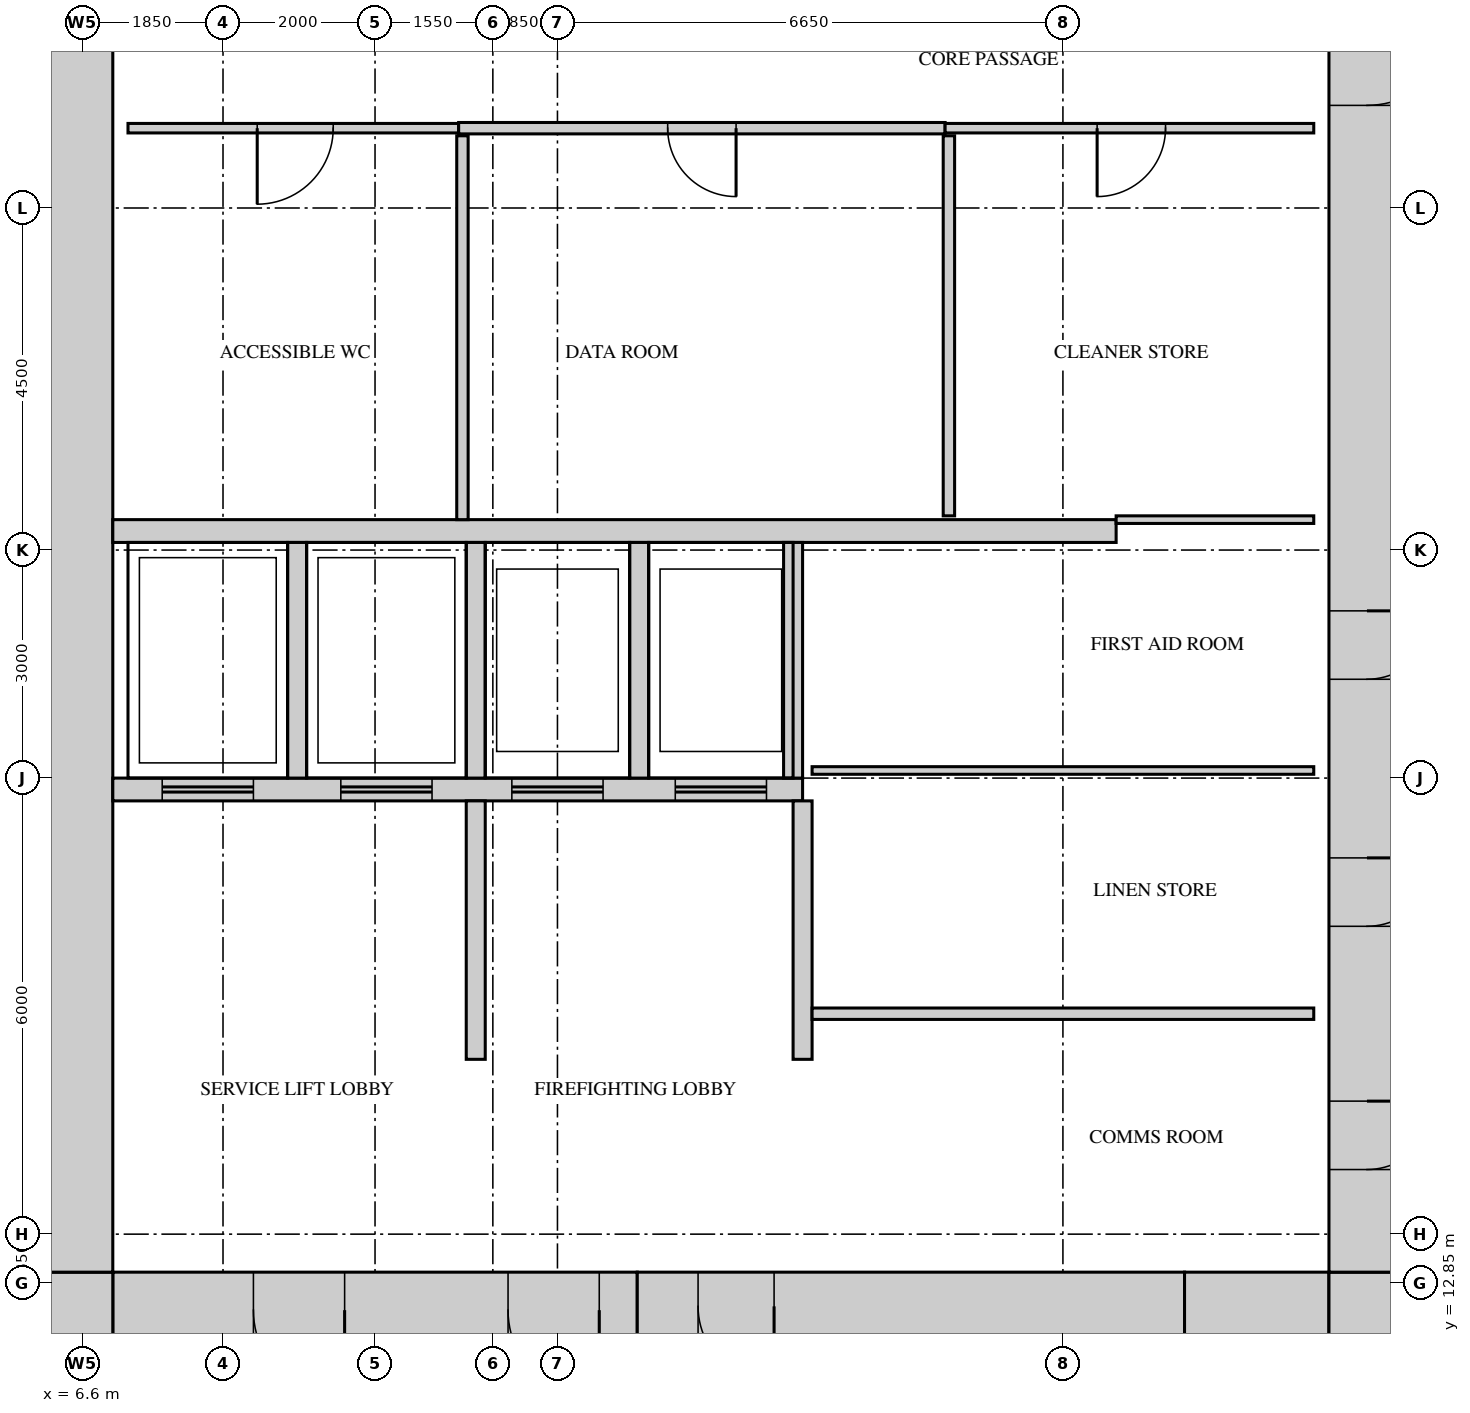
"""IFC4 building model, lengths in metres.
Left out: names, types, materials, properties, quantities, classifications, styles, units other than length and angle.
Written with IfcOpenShell. Run it as: python <this file> out.ifc"""

import sys

from ifc_helpers import new_model, si_unit, direction, frame, frame_2d, origin, place, context, subcontext, project, spatial, rectangle, extrude, source, transform, mapped, element, fill, save


model = new_model("IFC4")
c1 = context("Model", 3, precision=1e-05, world=origin(), true_north=direction((0.0, 1.0)))
c2 = subcontext(c1, "Body", "Model", "MODEL_VIEW")
j1 = project(units=[si_unit("LENGTHUNIT", "METRE"), si_unit("PLANEANGLEUNIT", "RADIAN")], contexts=[c1])
p1 = place(None, origin())
s1 = spatial("IfcSite", under=j1, at=p1, CompositionType="ELEMENT")
p2 = place(p1, origin())
s2 = spatial("IfcBuilding", under=s1, at=p2, CompositionType="ELEMENT")
p3 = place(p2, frame((0.0, 0.0, 127.9)))
s3 = spatial("IfcBuildingStorey", under=s2, at=p3, CompositionType="ELEMENT", Elevation=127.9)
m1 = source(origin(), c2, "Body", "SweptSolid", [
    extrude(rectangle(XDim=6.9, YDim=1.0, at=frame_2d((3.45, 0.0))), origin(), (0.0, 0.0, 1.0), 4.1),
])
p4 = place(p3, frame((7.0, 12.5, 0.0), z_axis=(0.0, 0.0, 1.0), x_axis=(1.0, 0.0, 0.0)))
e1 = element("IfcWall", 1, at=p4, inside=s3, PredefinedType="SHEAR", context=c2, shape_type="MappedRepresentation", body=[
    mapped(m1, transform((0.0, 0.0, 0.0))),
])
m2 = source(origin(), c2, "Body", "SweptSolid", [
    extrude(rectangle(XDim=1.2, YDim=2.1, at=frame_2d((0.6, 1.05))), frame((0.0, 0.51, 0.0), z_axis=(0.0, -1.0, 0.0), x_axis=(1.0, 0.0, 0.0)), (0.0, 0.0, 1.0), 1.02),
])
p5 = place(p4, frame((5.2, 0.0, 0.0)))
e2 = element("IfcOpeningElement", 2, at=p5, cuts=e1, PredefinedType="OPENING", context=c2, shape_type="MappedRepresentation", body=[
    mapped(m2, transform((0.0, 0.0, 0.0))),
])
p6 = place(p4, frame((1.85, 0.0, 0.0)))
e3 = element("IfcOpeningElement", 3, at=p6, cuts=e1, PredefinedType="OPENING", context=c2, shape_type="MappedRepresentation", body=[
    mapped(m2, transform((0.0, 0.0, 0.0))),
])
m3 = source(origin(), c2, "Body", "SweptSolid", [
    extrude(rectangle(XDim=7.2, YDim=0.9, at=frame_2d((3.6, 0.0))), origin(), (0.0, 0.0, 1.0), 4.1),
])
p7 = place(p3, frame((13.9, 12.55, 0.0), z_axis=(0.0, 0.0, 1.0), x_axis=(1.0, 0.0, 0.0)))
e4 = element("IfcWall", 4, at=p7, inside=s3, PredefinedType="SHEAR", context=c2, shape_type="MappedRepresentation", body=[
    mapped(m3, transform((0.0, 0.0, 0.0))),
])
m4 = source(origin(), c2, "Body", "SweptSolid", [
    extrude(rectangle(XDim=1.0, YDim=2.1, at=frame_2d((0.5, 1.05))), frame((0.0, 0.46, 0.0), z_axis=(0.0, -1.0, 0.0), x_axis=(1.0, 0.0, 0.0)), (0.0, 0.0, 1.0), 0.92),
])
p8 = place(p7, frame((0.8, 0.0, 0.0)))
e5 = element("IfcOpeningElement", 5, at=p8, cuts=e4, PredefinedType="OPENING", context=c2, shape_type="MappedRepresentation", body=[
    mapped(m4, transform((0.0, 0.0, 0.0))),
])
m5 = source(origin(), c2, "Body", "SweptSolid", [
    extrude(rectangle(XDim=1.9, YDim=1.0, at=frame_2d((0.95, 0.0))), origin(), (0.0, 0.0, 1.0), 4.1),
])
p9 = place(p3, frame((21.1, 12.5, 0.0), z_axis=(0.0, 0.0, 1.0), x_axis=(1.0, 0.0, 0.0)))
e6 = element("IfcWall", 6, at=p9, inside=s3, PredefinedType="SHEAR", context=c2, shape_type="MappedRepresentation", body=[
    mapped(m5, transform((0.0, 0.0, 0.0))),
])
m6 = source(origin(), c2, "Body", "SweptSolid", [
    extrude(rectangle(XDim=1.0, YDim=1.0, at=frame_2d((0.5, 0.0))), origin(), (0.0, 0.0, 1.0), 4.1),
])
for number, where, z_axis, x_axis in (
    (7, (23.0, 12.5, 0.0), (0.0, 0.0, 1.0), (1.0, 0.0, 0.0)),
    (8, (6.0, 12.5, 0.0), (0.0, 0.0, 1.0), (1.0, 0.0, 0.0)),
):
    element("IfcWall", number, at=place(p3, frame(where, z_axis=z_axis, x_axis=x_axis)), inside=s3, PredefinedType="SHEAR", context=c2, shape_type="MappedRepresentation", body=[
        mapped(m6, transform((0.0, 0.0, 0.0))),
    ])
m7 = source(origin(), c2, "Body", "SweptSolid", [
    extrude(rectangle(XDim=28.0, YDim=1.0, at=frame_2d((14.0, 0.0))), origin(), (0.0, 0.0, 1.0), 4.1),
])
p10 = place(p3, frame((23.5, 13.0, 0.0), z_axis=(0.0, 0.0, 1.0), x_axis=(0.0, 1.0, 0.0)))
e9 = element("IfcWall", 9, at=p10, inside=s3, PredefinedType="SHEAR", context=c2, shape_type="MappedRepresentation", body=[
    mapped(m7, transform((0.0, 0.0, 0.0))),
])
m8 = source(origin(), c2, "Body", "SweptSolid", [
    extrude(rectangle(XDim=1.8, YDim=2.1, at=frame_2d((0.9, 1.05))), frame((0.0, 0.51, 0.0), z_axis=(0.0, -1.0, 0.0), x_axis=(1.0, 0.0, 0.0)), (0.0, 0.0, 1.0), 1.02),
])
p11 = place(p10, frame((22.6, 0.0, 0.0)))
e10 = element("IfcOpeningElement", 10, at=p11, cuts=e9, PredefinedType="OPENING", context=c2, shape_type="MappedRepresentation", body=[
    mapped(m8, transform((0.0, 0.0, 0.0))),
])
p12 = place(p10, frame((15.35, 0.0, 0.0)))
e11 = element("IfcOpeningElement", 11, at=p12, cuts=e9, PredefinedType="OPENING", context=c2, shape_type="MappedRepresentation", body=[
    mapped(m2, transform((0.0, 0.0, 0.0))),
])
m9 = source(origin(), c2, "Body", "SweptSolid", [
    extrude(rectangle(XDim=0.9, YDim=2.1, at=frame_2d((0.45, 1.05))), frame((0.0, 0.51, 0.0), z_axis=(0.0, -1.0, 0.0), x_axis=(1.0, 0.0, 0.0)), (0.0, 0.0, 1.0), 1.02),
])
p13 = place(p10, frame((1.35, 0.0, 0.0)))
e12 = element("IfcOpeningElement", 12, at=p13, cuts=e9, PredefinedType="OPENING", context=c2, shape_type="MappedRepresentation", body=[
    mapped(m9, transform((0.0, 0.0, 0.0))),
])
p14 = place(p10, frame((4.55, 0.0, 0.0)))
e13 = element("IfcOpeningElement", 13, at=p14, cuts=e9, PredefinedType="OPENING", context=c2, shape_type="MappedRepresentation", body=[
    mapped(m9, transform((0.0, 0.0, 0.0))),
])
p15 = place(p10, frame((7.8, 0.0, 0.0)))
e14 = element("IfcOpeningElement", 14, at=p15, cuts=e9, PredefinedType="OPENING", context=c2, shape_type="MappedRepresentation", body=[
    mapped(m9, transform((0.0, 0.0, 0.0))),
])
p16 = place(p3, frame((6.5, 13.0, 0.0), z_axis=(0.0, 0.0, 1.0), x_axis=(0.0, 1.0, 0.0)))
e15 = element("IfcWall", 15, at=p16, inside=s3, PredefinedType="SHEAR", context=c2, shape_type="MappedRepresentation", body=[
    mapped(m7, transform((0.0, 0.0, 0.0))),
])
m10 = source(origin(), c2, "Body", "SweptSolid", [
    extrude(rectangle(XDim=13.2, YDim=0.3, at=frame_2d((6.6, 0.0))), origin(), (0.0, 0.0, 1.0), 4.1),
])
p17 = place(p3, frame((7.0, 22.75, 0.0), z_axis=(0.0, 0.0, 1.0), x_axis=(1.0, 0.0, 0.0)))
e16 = element("IfcWall", 16, at=p17, inside=s3, PredefinedType="STANDARD", context=c2, shape_type="MappedRepresentation", body=[
    mapped(m10, transform((0.0, 0.0, 0.0))),
])
m11 = source(origin(), c2, "Body", "SweptSolid", [
    extrude(rectangle(XDim=9.075, YDim=0.3, at=frame_2d((4.538, 0.0))), origin(), (0.0, 0.0, 1.0), 4.1),
])
p18 = place(p3, frame((7.0, 19.35, 0.0), z_axis=(0.0, 0.0, 1.0), x_axis=(1.0, 0.0, 0.0)))
e17 = element("IfcWall", 17, at=p18, inside=s3, PredefinedType="STANDARD", context=c2, shape_type="MappedRepresentation", body=[
    mapped(m11, transform((0.0, 0.0, 0.0))),
])
m12 = source(origin(), c2, "Body", "SweptSolid", [
    extrude(rectangle(XDim=1.2, YDim=2.1, at=frame_2d((0.6, 1.05))), frame((0.0, 0.16, 0.0), z_axis=(0.0, -1.0, 0.0), x_axis=(1.0, 0.0, 0.0)), (0.0, 0.0, 1.0), 0.32),
])
p19 = place(p18, frame((0.65, 0.0, 0.0)))
e18 = element("IfcOpeningElement", 18, at=p19, cuts=e17, PredefinedType="OPENING", context=c2, shape_type="MappedRepresentation", body=[
    mapped(m12, transform((0.0, 0.0, 0.0))),
])
p20 = place(p18, frame((3.0, 0.0, 0.0)))
e19 = element("IfcOpeningElement", 19, at=p20, cuts=e17, PredefinedType="OPENING", context=c2, shape_type="MappedRepresentation", body=[
    mapped(m12, transform((0.0, 0.0, 0.0))),
])
p21 = place(p18, frame((5.25, 0.0, 0.0)))
e20 = element("IfcOpeningElement", 20, at=p21, cuts=e17, PredefinedType="OPENING", context=c2, shape_type="MappedRepresentation", body=[
    mapped(m12, transform((0.0, 0.0, 0.0))),
])
p22 = place(p18, frame((7.4, 0.0, 0.0)))
e21 = element("IfcOpeningElement", 21, at=p22, cuts=e17, PredefinedType="OPENING", context=c2, shape_type="MappedRepresentation", body=[
    mapped(m12, transform((0.0, 0.0, 0.0))),
])
m13 = source(origin(), c2, "Body", "SweptSolid", [
    extrude(rectangle(XDim=3.1, YDim=0.25, at=frame_2d((1.55, 0.0))), origin(), (0.0, 0.0, 1.0), 4.1),
])
for number, where, z_axis, x_axis in (
    (22, (9.425, 19.5, 0.0), (0.0, 0.0, 1.0), (0.0, 1.0, 0.0)),
    (23, (11.775, 19.5, 0.0), (0.0, 0.0, 1.0), (0.0, 1.0, 0.0)),
    (24, (13.925, 19.5, 0.0), (0.0, 0.0, 1.0), (0.0, 1.0, 0.0)),
    (25, (15.95, 19.5, 0.0), (0.0, 0.0, 1.0), (0.0, 1.0, 0.0)),
):
    element("IfcWall", number, at=place(p3, frame(where, z_axis=z_axis, x_axis=x_axis)), inside=s3, PredefinedType="STANDARD", context=c2, shape_type="MappedRepresentation", body=[
        mapped(m13, transform((0.0, 0.0, 0.0))),
    ])
m14 = source(origin(), c2, "Body", "SweptSolid", [
    extrude(rectangle(XDim=3.4, YDim=0.25, at=frame_2d((1.7, 0.0))), origin(), (0.0, 0.0, 1.0), 4.1),
])
for number, where, z_axis, x_axis in (
    (26, (16.075, 15.8, 0.0), (0.0, 0.0, 1.0), (0.0, 1.0, 0.0)),
    (27, (11.775, 15.8, 0.0), (0.0, 0.0, 1.0), (0.0, 1.0, 0.0)),
):
    element("IfcWall", number, at=place(p3, frame(where, z_axis=z_axis, x_axis=x_axis)), inside=s3, PredefinedType="STANDARD", context=c2, shape_type="MappedRepresentation", body=[
        mapped(m14, transform((0.0, 0.0, 0.0))),
    ])
m15 = source(origin(), c2, "Body", "SweptSolid", [
    extrude(rectangle(XDim=6.6, YDim=0.15, at=frame_2d((3.3, 0.0))), origin(), (0.0, 0.0, 1.0), 4.2),
])
p23 = place(p3, frame((16.2, 16.4, 0.0), z_axis=(0.0, 0.0, 1.0), x_axis=(1.0, 0.0, 0.0)))
e28 = element("IfcWall", 28, at=p23, inside=s3, PredefinedType="PARTITIONING", context=c2, shape_type="MappedRepresentation", body=[
    mapped(m15, transform((0.0, 0.0, 0.0))),
])
m16 = source(origin(), c2, "Body", "SweptSolid", [
    extrude(rectangle(XDim=6.6, YDim=0.1, at=frame_2d((3.3, 0.0))), origin(), (0.0, 0.0, 1.0), 4.2),
])
p24 = place(p3, frame((16.2, 19.6, 0.0), z_axis=(0.0, 0.0, 1.0), x_axis=(1.0, 0.0, 0.0)))
e29 = element("IfcWall", 29, at=p24, inside=s3, PredefinedType="PARTITIONING", context=c2, shape_type="MappedRepresentation", body=[
    mapped(m16, transform((0.0, 0.0, 0.0))),
])
m17 = source(origin(), c2, "Body", "SweptSolid", [
    extrude(rectangle(XDim=5.05, YDim=0.15, at=frame_2d((2.525, 0.0))), origin(), (0.0, 0.0, 1.0), 4.2),
])
p25 = place(p3, frame((11.6, 22.9, 0.0), z_axis=(0.0, 0.0, 1.0), x_axis=(0.0, 1.0, 0.0)))
e30 = element("IfcWall", 30, at=p25, inside=s3, PredefinedType="PARTITIONING", context=c2, shape_type="MappedRepresentation", body=[
    mapped(m17, transform((0.0, 0.0, 0.0))),
])
m18 = source(origin(), c2, "Body", "SweptSolid", [
    extrude(rectangle(XDim=2.6, YDim=0.1, at=frame_2d((1.3, 0.0))), origin(), (0.0, 0.0, 1.0), 4.2),
])
p26 = place(p3, frame((20.2, 22.9, 0.0), z_axis=(0.0, 0.0, 1.0), x_axis=(1.0, 0.0, 0.0)))
e31 = element("IfcWall", 31, at=p26, inside=s3, PredefinedType="PARTITIONING", context=c2, shape_type="MappedRepresentation", body=[
    mapped(m18, transform((0.0, 0.0, 0.0))),
])
m19 = source(origin(), c2, "Body", "SweptSolid", [
    extrude(rectangle(XDim=5.0, YDim=0.15, at=frame_2d((2.5, 0.0))), origin(), (0.0, 0.0, 1.0), 4.2),
])
p27 = place(p3, frame((18.0, 22.95, 0.0), z_axis=(0.0, 0.0, 1.0), x_axis=(0.0, 1.0, 0.0)))
e32 = element("IfcWall", 32, at=p27, inside=s3, PredefinedType="PARTITIONING", context=c2, shape_type="MappedRepresentation", body=[
    mapped(m19, transform((0.0, 0.0, 0.0))),
])
m20 = source(origin(), c2, "Body", "SweptSolid", [
    extrude(rectangle(XDim=4.35, YDim=0.125, at=frame_2d((2.175, 0.0))), origin(), (0.0, 0.0, 1.0), 4.2),
])
p28 = place(p3, frame((7.2, 28.05, 0.0), z_axis=(0.0, 0.0, 1.0), x_axis=(1.0, 0.0, 0.0)))
e33 = element("IfcWall", 33, at=p28, inside=s3, PredefinedType="PARTITIONING", context=c2, shape_type="MappedRepresentation", body=[
    mapped(m20, transform((0.0, 0.0, 0.0))),
])
m21 = source(origin(), c2, "Body", "SweptSolid", [
    extrude(rectangle(XDim=1.0, YDim=2.1, at=frame_2d((0.5, 1.05))), frame((0.0, 0.073, 0.0), z_axis=(0.0, -1.0, 0.0), x_axis=(1.0, 0.0, 0.0)), (0.0, 0.0, 1.0), 0.145),
])
p29 = place(p28, frame((1.7, 0.0, 0.0)))
e34 = element("IfcOpeningElement", 34, at=p29, cuts=e33, PredefinedType="OPENING", context=c2, shape_type="MappedRepresentation", body=[
    mapped(m21, transform((0.0, 0.0, 0.0))),
])
m22 = source(origin(), c2, "Body", "SweptSolid", [
    extrude(rectangle(XDim=6.4, YDim=0.15, at=frame_2d((3.2, 0.0))), origin(), (0.0, 0.0, 1.0), 4.2),
])
p30 = place(p3, frame((11.55, 28.05, 0.0), z_axis=(0.0, 0.0, 1.0), x_axis=(1.0, 0.0, 0.0)))
e35 = element("IfcWall", 35, at=p30, inside=s3, PredefinedType="PARTITIONING", context=c2, shape_type="MappedRepresentation", body=[
    mapped(m22, transform((0.0, 0.0, 0.0))),
])
m23 = source(origin(), c2, "Body", "SweptSolid", [
    extrude(rectangle(XDim=0.9, YDim=2.1, at=frame_2d((0.45, 1.05))), frame((0.0, 0.085, 0.0), z_axis=(0.0, -1.0, 0.0), x_axis=(1.0, 0.0, 0.0)), (0.0, 0.0, 1.0), 0.17),
])
p31 = place(p30, frame((2.75, 0.0, 0.0)))
e36 = element("IfcOpeningElement", 36, at=p31, cuts=e35, PredefinedType="OPENING", context=c2, shape_type="MappedRepresentation", body=[
    mapped(m23, transform((0.0, 0.0, 0.0))),
])
m24 = source(origin(), c2, "Body", "SweptSolid", [
    extrude(rectangle(XDim=4.85, YDim=0.125, at=frame_2d((2.425, 0.0))), origin(), (0.0, 0.0, 1.0), 4.2),
])
p32 = place(p3, frame((17.95, 28.05, 0.0), z_axis=(0.0, 0.0, 1.0), x_axis=(1.0, 0.0, 0.0)))
e37 = element("IfcWall", 37, at=p32, inside=s3, PredefinedType="PARTITIONING", context=c2, shape_type="MappedRepresentation", body=[
    mapped(m24, transform((0.0, 0.0, 0.0))),
])
m25 = source(origin(), c2, "Body", "SweptSolid", [
    extrude(rectangle(XDim=0.9, YDim=2.1, at=frame_2d((0.45, 1.05))), frame((0.0, 0.073, 0.0), z_axis=(0.0, -1.0, 0.0), x_axis=(1.0, 0.0, 0.0)), (0.0, 0.0, 1.0), 0.145),
])
p33 = place(p32, frame((2.0, 0.0, 0.0)))
e38 = element("IfcOpeningElement", 38, at=p33, cuts=e37, PredefinedType="OPENING", context=c2, shape_type="MappedRepresentation", body=[
    mapped(m25, transform((0.0, 0.0, 0.0))),
])
m26 = source(origin(), c2, "Body", "SweptSolid", [
    extrude(rectangle(XDim=1.2, YDim=2.1, at=frame_2d((0.6, 1.05))), frame((0.0, 0.45, 0.0), z_axis=(0.0, -1.0, 0.0), x_axis=(1.0, 0.0, 0.0)), (0.0, 0.0, 1.0), 0.9),
])
p34 = place(p12, origin())
e39 = element("IfcDoor", 39, at=p34, inside=s3, OperationType="SINGLE_SWING_RIGHT", PredefinedType="DOOR", context=c2, shape_type="MappedRepresentation", body=[
    mapped(m26, transform((0.0, 0.0, 0.0))),
])
fill(e11, e39)
m27 = source(origin(), c2, "Body", "SweptSolid", [
    extrude(rectangle(XDim=1.0, YDim=2.1, at=frame_2d((0.5, 1.05))), frame((0.0, 0.025, 0.0), z_axis=(0.0, -1.0, 0.0), x_axis=(1.0, 0.0, 0.0)), (0.0, 0.0, 1.0), 0.05),
])
p35 = place(p29, origin())
e40 = element("IfcDoor", 40, at=p35, inside=s3, OperationType="SINGLE_SWING_LEFT", PredefinedType="DOOR", context=c2, shape_type="MappedRepresentation", body=[
    mapped(m27, transform((0.0, 0.0, 0.0))),
])
fill(e34, e40)
m28 = source(origin(), c2, "Body", "SweptSolid", [
    extrude(rectangle(XDim=0.9, YDim=2.1, at=frame_2d((0.45, 1.05))), frame((0.0, 0.025, 0.0), z_axis=(0.0, -1.0, 0.0), x_axis=(1.0, 0.0, 0.0)), (0.0, 0.0, 1.0), 0.05),
])
p36 = place(p31, origin())
e41 = element("IfcDoor", 41, at=p36, inside=s3, OperationType="SINGLE_SWING_RIGHT", PredefinedType="DOOR", context=c2, shape_type="MappedRepresentation", body=[
    mapped(m28, transform((0.0, 0.0, 0.0))),
])
fill(e36, e41)
p37 = place(p33, origin())
e42 = element("IfcDoor", 42, at=p37, inside=s3, OperationType="SINGLE_SWING_LEFT", PredefinedType="DOOR", context=c2, shape_type="MappedRepresentation", body=[
    mapped(m28, transform((0.0, 0.0, 0.0))),
])
fill(e38, e42)
m29 = source(origin(), c2, "Body", "SweptSolid", [
    extrude(rectangle(XDim=0.9, YDim=2.1, at=frame_2d((0.45, 1.05))), frame((0.0, 0.45, 0.0), z_axis=(0.0, -1.0, 0.0), x_axis=(1.0, 0.0, 0.0)), (0.0, 0.0, 1.0), 0.9),
])
p38 = place(p13, origin())
e43 = element("IfcDoor", 43, at=p38, inside=s3, OperationType="SINGLE_SWING_RIGHT", PredefinedType="DOOR", context=c2, shape_type="MappedRepresentation", body=[
    mapped(m29, transform((0.0, 0.0, 0.0))),
])
fill(e12, e43)
p39 = place(p14, origin())
e44 = element("IfcDoor", 44, at=p39, inside=s3, OperationType="SINGLE_SWING_RIGHT", PredefinedType="DOOR", context=c2, shape_type="MappedRepresentation", body=[
    mapped(m29, transform((0.0, 0.0, 0.0))),
])
fill(e13, e44)
p40 = place(p15, origin())
e45 = element("IfcDoor", 45, at=p40, inside=s3, OperationType="SINGLE_SWING_RIGHT", PredefinedType="DOOR", context=c2, shape_type="MappedRepresentation", body=[
    mapped(m29, transform((0.0, 0.0, 0.0))),
])
fill(e14, e45)
p41 = place(p5, origin())
e46 = element("IfcDoor", 46, at=p41, inside=s3, OperationType="SINGLE_SWING_RIGHT", PredefinedType="DOOR", context=c2, shape_type="MappedRepresentation", body=[
    mapped(m26, transform((0.0, 0.0, 0.0))),
])
fill(e2, e46)
p42 = place(p6, origin())
e47 = element("IfcDoor", 47, at=p42, inside=s3, OperationType="SINGLE_SWING_RIGHT", PredefinedType="DOOR", context=c2, shape_type="MappedRepresentation", body=[
    mapped(m26, transform((0.0, 0.0, 0.0))),
])
fill(e3, e47)
m30 = source(origin(), c2, "Body", "SweptSolid", [
    extrude(rectangle(XDim=1.0, YDim=2.1, at=frame_2d((0.5, 1.05))), frame((0.0, 0.4, 0.0), z_axis=(0.0, -1.0, 0.0), x_axis=(1.0, 0.0, 0.0)), (0.0, 0.0, 1.0), 0.8),
])
p43 = place(p8, origin())
e48 = element("IfcDoor", 48, at=p43, inside=s3, OperationType="SINGLE_SWING_RIGHT", PredefinedType="DOOR", context=c2, shape_type="MappedRepresentation", body=[
    mapped(m30, transform((0.0, 0.0, 0.0))),
])
fill(e5, e48)
m31 = source(origin(), c2, "Body", "SweptSolid", [
    extrude(rectangle(XDim=1.2, YDim=2.1, at=frame_2d((0.6, 1.05))), frame((0.0, 0.025, 0.0), z_axis=(0.0, -1.0, 0.0), x_axis=(1.0, 0.0, 0.0)), (0.0, 0.0, 1.0), 0.05),
])
p44 = place(p19, origin())
e49 = element("IfcDoor", 49, at=p44, inside=s3, OperationType="DOUBLE_DOOR_SLIDING", PredefinedType="DOOR", context=c2, shape_type="MappedRepresentation", body=[
    mapped(m31, transform((0.0, 0.0, 0.0))),
])
fill(e18, e49)
p45 = place(p20, origin())
e50 = element("IfcDoor", 50, at=p45, inside=s3, OperationType="DOUBLE_DOOR_SLIDING", PredefinedType="DOOR", context=c2, shape_type="MappedRepresentation", body=[
    mapped(m31, transform((0.0, 0.0, 0.0))),
])
fill(e19, e50)
p46 = place(p21, origin())
e51 = element("IfcDoor", 51, at=p46, inside=s3, OperationType="DOUBLE_DOOR_SLIDING", PredefinedType="DOOR", context=c2, shape_type="MappedRepresentation", body=[
    mapped(m31, transform((0.0, 0.0, 0.0))),
])
fill(e20, e51)
p47 = place(p22, origin())
e52 = element("IfcDoor", 52, at=p47, inside=s3, OperationType="DOUBLE_DOOR_SLIDING", PredefinedType="DOOR", context=c2, shape_type="MappedRepresentation", body=[
    mapped(m31, transform((0.0, 0.0, 0.0))),
])
fill(e21, e52)
save(model, sys.argv[1])
